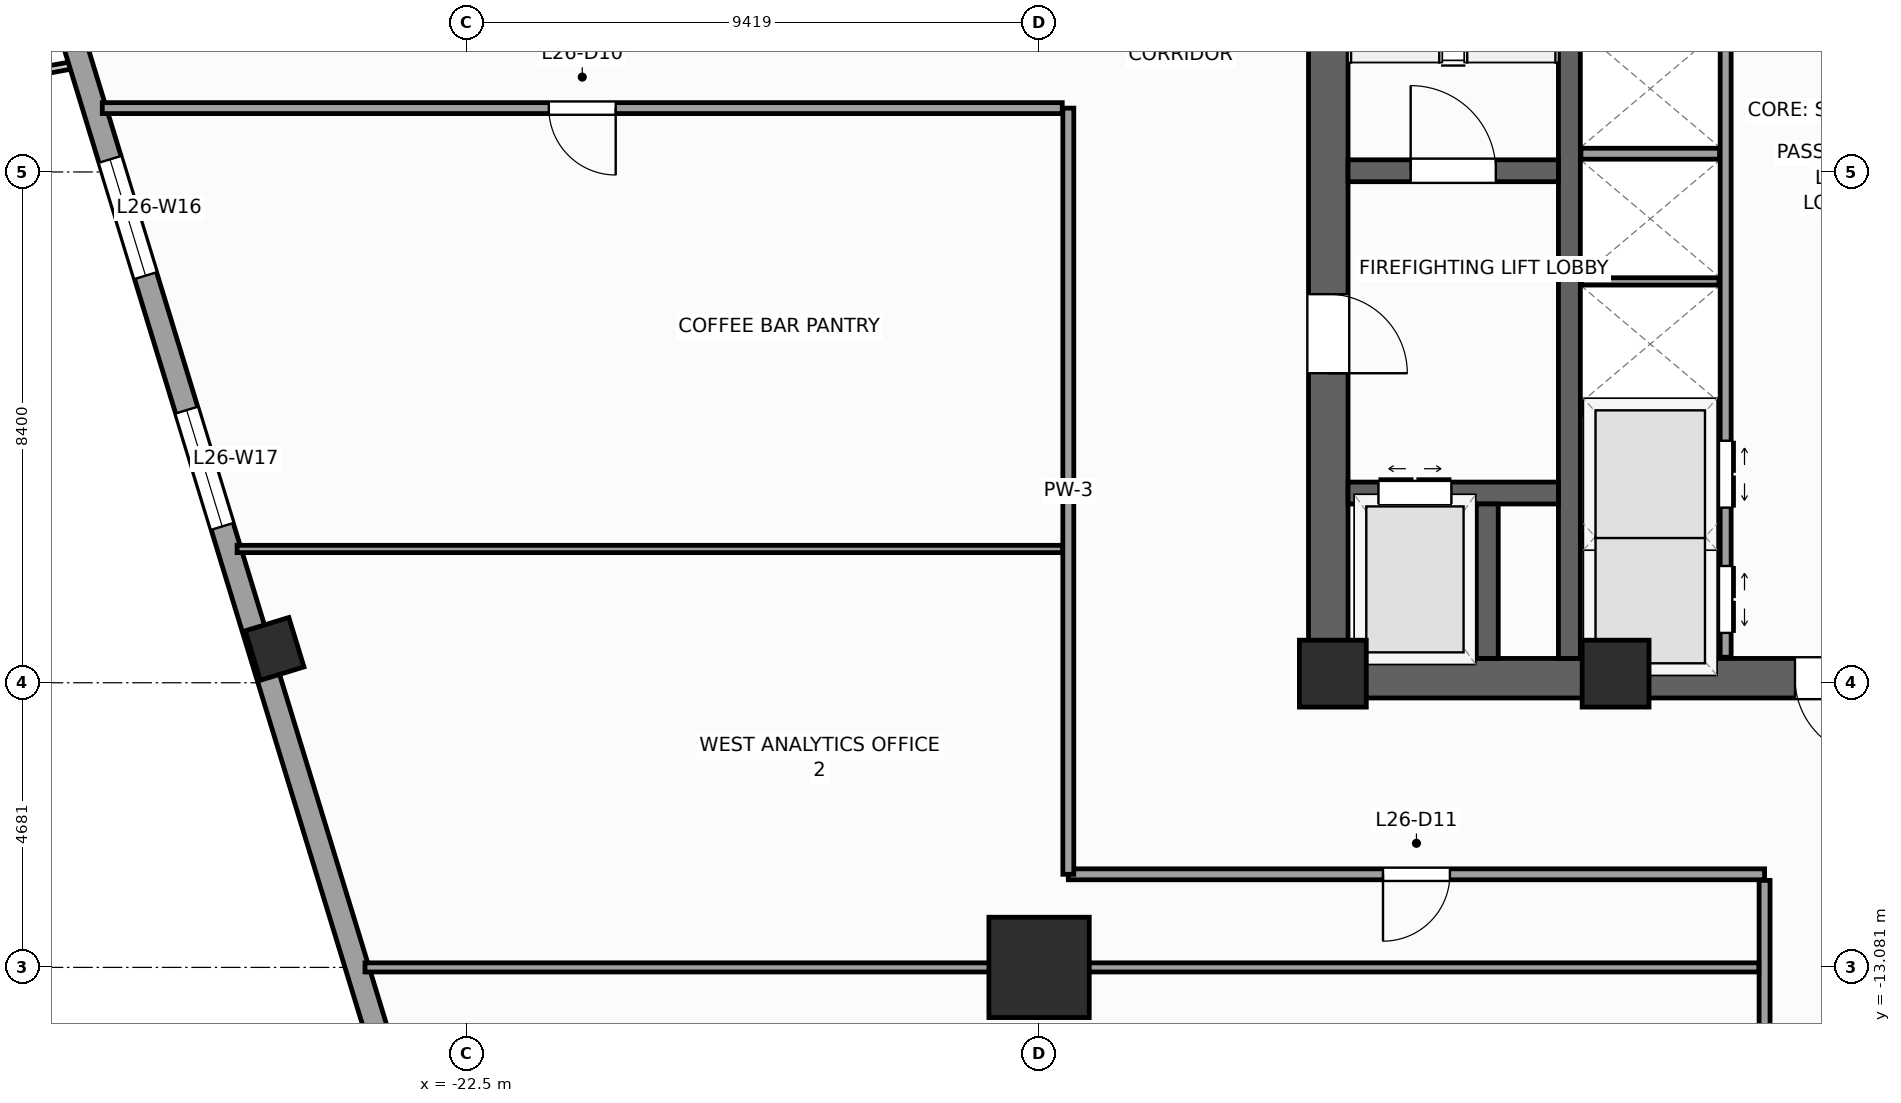
"""IFC4 building model, lengths in metres.
Left out: names, types, materials, properties, quantities, classifications, styles, units other than length and angle.
Written with IfcOpenShell. Run it as: python <this file> out.ifc"""

import sys

from ifc_helpers import new_model, si_unit, direction, frame, frame_2d, origin, origin_2d, place, context, subcontext, project, spatial, rectangle, extrude, source, transform, mapped, element, fill, save


model = new_model("IFC4")
c1 = context("Model", 3, precision=1e-05, world=origin(), true_north=direction((0.0, 1.0)))
c2 = subcontext(c1, "Body", "Model", "MODEL_VIEW")
j1 = project(units=[si_unit("LENGTHUNIT", "METRE"), si_unit("PLANEANGLEUNIT", "RADIAN")], contexts=[c1])
p1 = place(None, origin())
s1 = spatial("IfcSite", under=j1, at=p1, CompositionType="ELEMENT")
p2 = place(p1, origin())
s2 = spatial("IfcBuilding", under=s1, at=p2, CompositionType="ELEMENT")
p3 = place(p2, frame((0.0, 0.0, 111.2)))
s3 = spatial("IfcBuildingStorey", under=s2, at=p3, CompositionType="ELEMENT", Elevation=111.2)
p4 = place(p3, frame((-8.65, -8.325, 0.0), z_axis=(0.0, 0.0, 1.0), x_axis=(1.0, 0.0, 0.0)))
e1 = element("IfcWall", 1, at=p4, inside=s3, PredefinedType="SHEAR", context=c2, shape_type="SweptSolid", body=[
    extrude(rectangle(XDim=17.3, YDim=0.65, at=frame_2d((8.65, 0.0))), origin(), (0.0, 0.0, 1.0), 4.0),
])
p5 = place(p4, frame((8.0, 0.0, 0.0)))
e2 = element("IfcOpeningElement", 2, at=p5, cuts=e1, PredefinedType="OPENING", context=c2, shape_type="SweptSolid", body=[
    extrude(rectangle(XDim=1.3, YDim=2.2, at=frame_2d((0.65, 1.1))), frame((0.0, 0.335, 0.0), z_axis=(0.0, -1.0, 0.0), x_axis=(1.0, 0.0, 0.0)), (0.0, 0.0, 1.0), 0.67),
])
p6 = place(p3, frame((-8.325, -8.0, 0.0), z_axis=(0.0, 0.0, 1.0), x_axis=(0.0, 1.0, 0.0)))
e3 = element("IfcWall", 3, at=p6, inside=s3, PredefinedType="SHEAR", context=c2, shape_type="SweptSolid", body=[
    extrude(rectangle(XDim=16.0, YDim=0.65, at=frame_2d((8.0, 0.0))), origin(), (0.0, 0.0, 1.0), 4.0),
])
p7 = place(p6, frame((4.69, 0.0, 0.0)))
e4 = element("IfcOpeningElement", 4, at=p7, cuts=e3, PredefinedType="OPENING", context=c2, shape_type="SweptSolid", body=[
    extrude(rectangle(XDim=1.3, YDim=2.2, at=frame_2d((0.65, 1.1))), frame((0.0, 0.335, 0.0), z_axis=(0.0, -1.0, 0.0), x_axis=(1.0, 0.0, 0.0)), (0.0, 0.0, 1.0), 0.67),
])
p8 = place(p3, frame((-4.36, -8.0, 0.0), z_axis=(0.0, 0.0, 1.0), x_axis=(0.0, 1.0, 0.0)))
e5 = element("IfcWall", 5, at=p8, inside=s3, PredefinedType="SHEAR", context=c2, shape_type="SweptSolid", body=[
    extrude(rectangle(XDim=16.0, YDim=0.36, at=frame_2d((8.0, 0.0))), origin(), (0.0, 0.0, 1.0), 4.0),
])
p9 = place(p3, frame((-8.0, 0.02, 0.0), z_axis=(0.0, 0.0, 1.0), x_axis=(1.0, 0.0, 0.0)))
e6 = element("IfcWall", 6, at=p9, inside=s3, PredefinedType="SHEAR", context=c2, shape_type="SweptSolid", body=[
    extrude(rectangle(XDim=3.46, YDim=0.36, at=frame_2d((1.73, 0.0))), origin(), (0.0, 0.0, 1.0), 4.0),
])
p10 = place(p9, frame((1.03, 0.0, 0.0)))
e7 = element("IfcOpeningElement", 7, at=p10, cuts=e6, PredefinedType="OPENING", context=c2, shape_type="SweptSolid", body=[
    extrude(rectangle(XDim=1.4, YDim=2.2, at=frame_2d((0.7, 1.1))), frame((0.0, 0.19, 0.0), z_axis=(0.0, -1.0, 0.0), x_axis=(1.0, 0.0, 0.0)), (0.0, 0.0, 1.0), 0.38),
])
p11 = place(p3, frame((-8.0, -5.28, 0.0), z_axis=(0.0, 0.0, 1.0), x_axis=(1.0, 0.0, 0.0)))
e8 = element("IfcWall", 8, at=p11, inside=s3, PredefinedType="SHEAR", context=c2, shape_type="SweptSolid", body=[
    extrude(rectangle(XDim=3.46, YDim=0.36, at=frame_2d((1.73, 0.0))), origin(), (0.0, 0.0, 1.0), 4.0),
])
p12 = place(p11, frame((0.5, 0.0, 0.0)))
e9 = element("IfcOpeningElement", 9, at=p12, cuts=e8, PredefinedType="OPENING", context=c2, shape_type="SweptSolid", body=[
    extrude(rectangle(XDim=1.2, YDim=2.25, at=frame_2d((0.6, 1.125))), frame((0.0, 0.19, 0.0), z_axis=(0.0, -1.0, 0.0), x_axis=(1.0, 0.0, 0.0)), (0.0, 0.0, 1.0), 0.38),
])
p13 = place(p3, frame((-5.71, -8.0, 0.0), z_axis=(0.0, 0.0, 1.0), x_axis=(0.0, 1.0, 0.0)))
e10 = element("IfcWall", 10, at=p13, inside=s3, PredefinedType="SHEAR", context=c2, shape_type="SweptSolid", body=[
    extrude(rectangle(XDim=2.54, YDim=0.36, at=frame_2d((1.27, 0.0))), origin(), (0.0, 0.0, 1.0), 4.0),
])
m1 = source(origin(), c2, "Body", "SweptSolid", [
    extrude(rectangle(XDim=1.1, YDim=1.1, at=origin_2d()), origin(), (0.0, 0.0, 1.0), 4.0),
])
for number, where, z_axis, x_axis in (
    (11, (-8.25, -8.25, 0.0), (0.0, 0.0, 1.0), (1.0, 0.0, 0.0)),
    (12, (-3.6, -8.25, 0.0), (0.0, 0.0, 1.0), (1.0, 0.0, 0.0)),
):
    element("IfcColumn", number, at=place(p3, frame(where, z_axis=z_axis, x_axis=x_axis)), inside=s3, PredefinedType="PILASTER", context=c2, shape_type="MappedRepresentation", body=[
        mapped(m1, transform((0.0, 0.0, 0.0), scale=1.0)),
    ])
m2 = source(origin(), c2, "Body", "SweptSolid", [
    extrude(rectangle(XDim=1.65, YDim=1.65, at=origin_2d()), origin(), (0.0, 0.0, 1.0), 4.0),
])
p14 = place(p3, frame((-13.081, -13.081, 0.0), z_axis=(0.0, 0.0, 1.0), x_axis=(1.0, 0.0, 0.0)))
e13 = element("IfcColumn", 13, at=p14, inside=s3, PredefinedType="COLUMN", context=c2, shape_type="MappedRepresentation", body=[
    mapped(m2, transform((0.0, 0.0, 0.0), scale=1.0)),
])
m3 = source(origin(), c2, "Body", "SweptSolid", [
    extrude(rectangle(XDim=0.75, YDim=0.85, at=origin_2d()), origin(), (0.0, 0.0, 1.0), 4.0),
])
p15 = place(p3, frame((-25.653, -7.843, 0.0), z_axis=(0.0, 0.0, 1.0), x_axis=(0.956304755963, 0.292371704723, 0.0)))
e14 = element("IfcColumn", 14, at=p15, inside=s3, PredefinedType="COLUMN", context=c2, shape_type="MappedRepresentation", body=[
    mapped(m3, transform((0.0, 0.0, 0.0), scale=1.0)),
])
p16 = place(p3, frame((-32.658, 14.265, 0.0), z_axis=(0.0, 0.0, 1.0), x_axis=(0.292373127906, -0.956304320851, 0.0)))
e15 = element("IfcWall", 15, at=p16, inside=s3, PredefinedType="STANDARD", context=c2, shape_type="SweptSolid", body=[
    extrude(rectangle(XDim=46.38, YDim=0.38, at=frame_2d((23.19, 0.0))), origin(), (0.0, 0.0, 1.0), 3.14),
])
p17 = place(p16, frame((4.865, 0.0, 0.51)))
e16 = element("IfcOpeningElement", 16, at=p17, cuts=e15, PredefinedType="OPENING", context=c2, shape_type="SweptSolid", body=[
    extrude(rectangle(XDim=1.4, YDim=2.4, at=frame_2d((0.7, 1.2))), frame((0.0, 0.2, 0.0), z_axis=(0.0, -1.0, 0.0), x_axis=(1.0, 0.0, 0.0)), (0.0, 0.0, 1.0), 0.4),
])
p18 = place(p16, frame((14.7, 0.0, 0.51)))
e17 = element("IfcOpeningElement", 17, at=p18, cuts=e15, PredefinedType="OPENING", context=c2, shape_type="SweptSolid", body=[
    extrude(rectangle(XDim=2.0, YDim=2.4, at=frame_2d((1.0, 1.2))), frame((0.0, 0.2, 0.0), z_axis=(0.0, -1.0, 0.0), x_axis=(1.0, 0.0, 0.0)), (0.0, 0.0, 1.0), 0.4),
])
p19 = place(p16, frame((19.012, 0.0, 0.51)))
e18 = element("IfcOpeningElement", 18, at=p19, cuts=e15, PredefinedType="OPENING", context=c2, shape_type="SweptSolid", body=[
    extrude(rectangle(XDim=2.0, YDim=2.4, at=frame_2d((1.0, 1.2))), frame((0.0, 0.2, 0.0), z_axis=(0.0, -1.0, 0.0), x_axis=(1.0, 0.0, 0.0)), (0.0, 0.0, 1.0), 0.4),
])
p20 = place(p16, frame((30.538, 0.0, 0.51)))
e19 = element("IfcOpeningElement", 19, at=p20, cuts=e15, PredefinedType="OPENING", context=c2, shape_type="SweptSolid", body=[
    extrude(rectangle(XDim=2.0, YDim=2.4, at=frame_2d((1.0, 1.2))), frame((0.0, 0.2, 0.0), z_axis=(0.0, -1.0, 0.0), x_axis=(1.0, 0.0, 0.0)), (0.0, 0.0, 1.0), 0.4),
])
p21 = place(p16, frame((39.187, 0.0, 0.51)))
e20 = element("IfcOpeningElement", 20, at=p21, cuts=e15, PredefinedType="OPENING", context=c2, shape_type="SweptSolid", body=[
    extrude(rectangle(XDim=1.4, YDim=2.4, at=frame_2d((0.7, 1.2))), frame((0.0, 0.2, 0.0), z_axis=(0.0, -1.0, 0.0), x_axis=(1.0, 0.0, 0.0)), (0.0, 0.0, 1.0), 0.4),
])
p22 = place(p3, frame((-1.79, -7.98, 0.0), z_axis=(0.0, 0.0, 1.0), x_axis=(0.0, 1.0, 0.0)))
e21 = element("IfcWall", 21, at=p22, inside=s3, PredefinedType="PARTITIONING", context=c2, shape_type="SweptSolid", body=[
    extrude(rectangle(XDim=12.38, YDim=0.18, at=frame_2d((6.19, 0.0))), origin(), (0.0, 0.0, 1.0), 3.74),
])
p23 = place(p22, frame((0.4, 0.0, 0.0)))
e22 = element("IfcOpeningElement", 22, at=p23, cuts=e21, PredefinedType="OPENING", context=c2, shape_type="SweptSolid", body=[
    extrude(rectangle(XDim=1.1, YDim=2.2, at=frame_2d((0.55, 1.1))), frame((0.0, 0.1, 0.0), z_axis=(0.0, -1.0, 0.0), x_axis=(1.0, 0.0, 0.0)), (0.0, 0.0, 1.0), 0.2),
])
p24 = place(p22, frame((2.46, 0.0, 0.0)))
e23 = element("IfcOpeningElement", 23, at=p24, cuts=e21, PredefinedType="OPENING", context=c2, shape_type="SweptSolid", body=[
    extrude(rectangle(XDim=1.1, YDim=2.2, at=frame_2d((0.55, 1.1))), frame((0.0, 0.1, 0.0), z_axis=(0.0, -1.0, 0.0), x_axis=(1.0, 0.0, 0.0)), (0.0, 0.0, 1.0), 0.2),
])
for number, where, z_axis, x_axis in (
    (24, (-4.17, -3.9, 0.0), (0.0, 0.0, 1.0), (1.0, 0.0, 0.0)),
    (25, (-4.17, 0.3, 0.0), (0.0, 0.0, 1.0), (1.0, 0.0, 0.0)),
):
    element("IfcWall", number, at=place(p3, frame(where, z_axis=z_axis, x_axis=x_axis)), inside=s3, PredefinedType="PARTITIONING", context=c2, shape_type="SweptSolid", body=[
        extrude(rectangle(XDim=2.28, YDim=0.18, at=frame_2d((1.14, 0.0))), origin(), (0.0, 0.0, 1.0), 3.74),
    ])
for number, where, z_axis, x_axis in (
    (26, (-4.16, -6.0, 0.0), (0.0, 0.0, 1.0), (1.0, 0.0, 0.0)),
    (27, (-4.16, -1.8, 0.0), (0.0, 0.0, 1.0), (1.0, 0.0, 0.0)),
):
    element("IfcWall", number, at=place(p3, frame(where, z_axis=z_axis, x_axis=x_axis)), inside=s3, PredefinedType="PARTITIONING", context=c2, shape_type="SweptSolid", body=[
        extrude(rectangle(XDim=2.26, YDim=0.12, at=frame_2d((1.13, 0.0))), origin(), (0.0, 0.0, 1.0), 3.74),
    ])
p25 = place(p3, frame((-12.6, -11.55, 0.0), z_axis=(0.0, 0.0, 1.0), x_axis=(1.0, 0.0, 0.0)))
e28 = element("IfcWall", 28, at=p25, inside=s3, PredefinedType="PARTITIONING", context=c2, shape_type="SweptSolid", body=[
    extrude(rectangle(XDim=11.45, YDim=0.18, at=frame_2d((5.725, 0.0))), origin(), (0.0, 0.0, 1.0), 3.74),
])
p26 = place(p25, frame((5.175, 0.0, 0.0)))
e29 = element("IfcOpeningElement", 29, at=p26, cuts=e28, PredefinedType="OPENING", context=c2, shape_type="SweptSolid", body=[
    extrude(rectangle(XDim=1.1, YDim=2.2, at=frame_2d((0.55, 1.1))), frame((0.0, 0.1, 0.0), z_axis=(0.0, -1.0, 0.0), x_axis=(1.0, 0.0, 0.0)), (0.0, 0.0, 1.0), 0.2),
])
p27 = place(p3, frame((-12.6, -11.55, 0.0), z_axis=(0.0, 0.0, 1.0), x_axis=(0.0, 1.0, 0.0)))
e30 = element("IfcWall", 30, at=p27, inside=s3, PredefinedType="PARTITIONING", context=c2, shape_type="SweptSolid", body=[
    extrude(rectangle(XDim=12.6, YDim=0.18, at=frame_2d((6.3, 0.0))), origin(), (0.0, 0.0, 1.0), 3.74),
])
p28 = place(p3, frame((-28.487, 1.05, 0.0), z_axis=(0.0, 0.0, 1.0), x_axis=(1.0, 0.0, 0.0)))
e31 = element("IfcWall", 31, at=p28, inside=s3, PredefinedType="PARTITIONING", context=c2, shape_type="SweptSolid", body=[
    extrude(rectangle(XDim=15.787, YDim=0.18, at=frame_2d((7.894, 0.0))), origin(), (0.0, 0.0, 1.0), 3.74),
])
p29 = place(p28, frame((7.343, 0.0, 0.0)))
e32 = element("IfcOpeningElement", 32, at=p29, cuts=e31, PredefinedType="OPENING", context=c2, shape_type="SweptSolid", body=[
    extrude(rectangle(XDim=1.1, YDim=2.2, at=frame_2d((0.55, 1.1))), frame((0.0, 0.1, 0.0), z_axis=(0.0, -1.0, 0.0), x_axis=(1.0, 0.0, 0.0)), (0.0, 0.0, 1.0), 0.2),
])
p30 = place(p3, frame((-1.15, -28.517, 0.0), z_axis=(0.0, 0.0, 1.0), x_axis=(0.0, 1.0, 0.0)))
e33 = element("IfcWall", 33, at=p30, inside=s3, PredefinedType="PARTITIONING", context=c2, shape_type="SweptSolid", body=[
    extrude(rectangle(XDim=16.867, YDim=0.18, at=frame_2d((8.434, 0.0))), origin(), (0.0, 0.0, 1.0), 3.41),
])
p31 = place(p30, frame((7.333, 0.0, 0.0)))
e34 = element("IfcOpeningElement", 34, at=p31, cuts=e33, PredefinedType="OPENING", context=c2, shape_type="SweptSolid", body=[
    extrude(rectangle(XDim=1.1, YDim=2.2, at=frame_2d((0.55, 1.1))), frame((0.0, 0.1, 0.0), z_axis=(0.0, -1.0, 0.0), x_axis=(1.0, 0.0, 0.0)), (0.0, 0.0, 1.0), 0.2),
])
p32 = place(p3, frame((-24.167, -13.081, 0.0), z_axis=(0.0, 0.0, 1.0), x_axis=(1.0, 0.0, 0.0)))
e35 = element("IfcWall", 35, at=p32, inside=s3, PredefinedType="PARTITIONING", context=c2, shape_type="SweptSolid", body=[
    extrude(rectangle(XDim=22.921, YDim=0.15, at=frame_2d((11.461, 0.0))), origin(), (0.0, 0.0, 1.0), 2.732),
])
p33 = place(p3, frame((-26.27, -6.2, 0.0), z_axis=(0.0, 0.0, 1.0), x_axis=(1.0, 0.0, 0.0)))
e36 = element("IfcWall", 36, at=p33, inside=s3, PredefinedType="PARTITIONING", context=c2, shape_type="SweptSolid", body=[
    extrude(rectangle(XDim=13.575, YDim=0.12, at=frame_2d((6.788, 0.0))), origin(), (0.0, 0.0, 1.0), 3.74),
])
m4 = source(origin(), c2, "Body", "SweptSolid", [
    extrude(rectangle(XDim=2.0, YDim=2.4, at=frame_2d((1.0, 1.2))), frame((0.0, 0.03, 0.0), z_axis=(0.0, -1.0, 0.0), x_axis=(1.0, 0.0, 0.0)), (0.0, 0.0, 1.0), 0.06),
])
p34 = place(p18, origin())
e37 = element("IfcWindow", 37, at=p34, inside=s3, PartitioningType="SINGLE_PANEL", PredefinedType="WINDOW", context=c2, shape_type="MappedRepresentation", body=[
    mapped(m4, transform((0.0, 0.0, 0.0), scale=1.0)),
])
fill(e17, e37)
p35 = place(p19, origin())
e38 = element("IfcWindow", 38, at=p35, inside=s3, PartitioningType="SINGLE_PANEL", PredefinedType="WINDOW", context=c2, shape_type="MappedRepresentation", body=[
    mapped(m4, transform((0.0, 0.0, 0.0), scale=1.0)),
])
fill(e18, e38)
m5 = source(origin(), c2, "Body", "SweptSolid", [
    extrude(rectangle(XDim=1.4, YDim=2.2, at=frame_2d((0.7, 1.1))), frame((0.0, 0.025, 0.0), z_axis=(0.0, -1.0, 0.0), x_axis=(1.0, 0.0, 0.0)), (0.0, 0.0, 1.0), 0.05),
])
p36 = place(p10, origin())
e39 = element("IfcDoor", 39, at=p36, inside=s3, OperationType="SINGLE_SWING_LEFT", PredefinedType="DOOR", context=c2, shape_type="MappedRepresentation", body=[
    mapped(m5, transform((0.0, 0.0, 0.0), scale=1.0)),
])
fill(e7, e39)
m6 = source(origin(), c2, "Body", "SweptSolid", [
    extrude(rectangle(XDim=1.3, YDim=2.2, at=frame_2d((0.65, 1.1))), frame((0.0, 0.025, 0.0), z_axis=(0.0, -1.0, 0.0), x_axis=(1.0, 0.0, 0.0)), (0.0, 0.0, 1.0), 0.05),
])
p37 = place(p7, frame((1.3, 0.0, 0.0), z_axis=(0.0, 0.0, 1.0), x_axis=(-1.0, 0.0, 0.0)))
e40 = element("IfcDoor", 40, at=p37, inside=s3, OperationType="SINGLE_SWING_LEFT", PredefinedType="DOOR", context=c2, shape_type="MappedRepresentation", body=[
    mapped(m6, transform((0.0, 0.0, 0.0), scale=1.0)),
])
fill(e4, e40)
p38 = place(p5, frame((1.3, 0.0, 0.0), z_axis=(0.0, 0.0, 1.0), x_axis=(-1.0, 0.0, 0.0)))
e41 = element("IfcDoor", 41, at=p38, inside=s3, OperationType="SINGLE_SWING_RIGHT", PredefinedType="DOOR", context=c2, shape_type="MappedRepresentation", body=[
    mapped(m6, transform((0.0, 0.0, 0.0), scale=1.0)),
])
fill(e2, e41)
m7 = source(origin(), c2, "Body", "SweptSolid", [
    extrude(rectangle(XDim=1.2, YDim=2.25, at=frame_2d((0.6, 1.125))), frame((0.0, 0.025, 0.0), z_axis=(0.0, -1.0, 0.0), x_axis=(1.0, 0.0, 0.0)), (0.0, 0.0, 1.0), 0.05),
])
p39 = place(p12, origin())
e42 = element("IfcDoor", 42, at=p39, inside=s3, OperationType="DOUBLE_DOOR_SLIDING", PredefinedType="DOOR", context=c2, shape_type="MappedRepresentation", body=[
    mapped(m7, transform((0.0, 0.0, 0.0), scale=1.0)),
])
fill(e9, e42)
m8 = source(origin(), c2, "Body", "SweptSolid", [
    extrude(rectangle(XDim=1.1, YDim=2.2, at=frame_2d((0.55, 1.1))), frame((0.0, 0.025, 0.0), z_axis=(0.0, -1.0, 0.0), x_axis=(1.0, 0.0, 0.0)), (0.0, 0.0, 1.0), 0.05),
])
p40 = place(p23, frame((1.1, 0.0, 0.0), z_axis=(0.0, 0.0, 1.0), x_axis=(-1.0, 0.0, 0.0)))
e43 = element("IfcDoor", 43, at=p40, inside=s3, OperationType="DOUBLE_DOOR_SLIDING", PredefinedType="DOOR", context=c2, shape_type="MappedRepresentation", body=[
    mapped(m8, transform((0.0, 0.0, 0.0), scale=1.0)),
])
fill(e22, e43)
p41 = place(p24, frame((1.1, 0.0, 0.0), z_axis=(0.0, 0.0, 1.0), x_axis=(-1.0, 0.0, 0.0)))
e44 = element("IfcDoor", 44, at=p41, inside=s3, OperationType="DOUBLE_DOOR_SLIDING", PredefinedType="DOOR", context=c2, shape_type="MappedRepresentation", body=[
    mapped(m8, transform((0.0, 0.0, 0.0), scale=1.0)),
])
fill(e23, e44)
p42 = place(p29, frame((1.1, 0.0, 0.0), z_axis=(0.0, 0.0, 1.0), x_axis=(-1.0, 0.0, 0.0)))
e45 = element("IfcDoor", 45, at=p42, inside=s3, OperationType="SINGLE_SWING_RIGHT", PredefinedType="DOOR", context=c2, shape_type="MappedRepresentation", body=[
    mapped(m8, transform((0.0, 0.0, 0.0), scale=1.0)),
])
fill(e32, e45)
p43 = place(p26, frame((1.1, 0.0, 0.0), z_axis=(0.0, 0.0, 1.0), x_axis=(-1.0, 0.0, 0.0)))
e46 = element("IfcDoor", 46, at=p43, inside=s3, OperationType="SINGLE_SWING_LEFT", PredefinedType="DOOR", context=c2, shape_type="MappedRepresentation", body=[
    mapped(m8, transform((0.0, 0.0, 0.0), scale=1.0)),
])
fill(e29, e46)
save(model, sys.argv[1])
